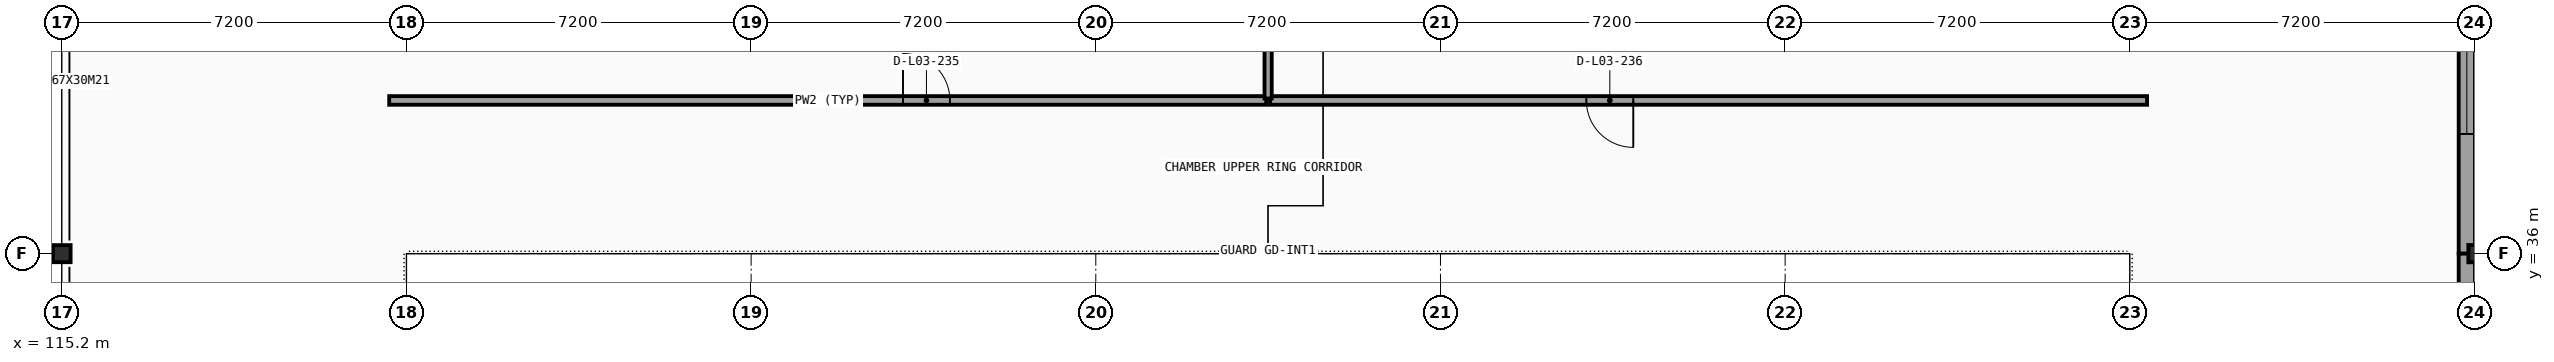
"""IFC4 building model, lengths in metres.
Left out: names, types, materials, properties, quantities, classifications, styles, units other than length and angle.
Written with IfcOpenShell. Run it as: python <this file> out.ifc"""

import sys

from ifc_helpers import new_model, si_unit, direction, frame, frame_2d, origin, origin_2d, place, context, subcontext, project, spatial, rectangle, i_section, extrude, element, fill, save


model = new_model("IFC4")
c1 = context("Model", 3, precision=1e-05, world=origin(), true_north=direction((0.0, 1.0)))
c2 = subcontext(c1, "Body", "Model", "MODEL_VIEW")
j1 = project(units=[si_unit("LENGTHUNIT", "METRE"), si_unit("PLANEANGLEUNIT", "RADIAN")], contexts=[c1])
p1 = place(None, origin())
s1 = spatial("IfcSite", under=j1, at=p1, CompositionType="ELEMENT")
p2 = place(p1, origin())
s2 = spatial("IfcBuilding", under=s1, at=p2, CompositionType="ELEMENT")
p3 = place(p2, frame((0.0, 0.0, 14.7)))
s3 = spatial("IfcBuildingStorey", under=s2, at=p3, CompositionType="ELEMENT", Elevation=14.7)
p4 = place(p3, frame((115.2, 36.0, 0.0), z_axis=(0.0, 0.0, 1.0), x_axis=(1.0, 0.0, 0.0)))
e1 = element("IfcColumn", 1, at=p4, inside=s3, PredefinedType="COLUMN", context=c2, shape_type="SweptSolid", body=[
    extrude(i_section(OverallWidth=0.369, OverallDepth=0.356, WebThickness=0.011, FlangeThickness=0.018, FilletRadius=0.018, at=origin_2d()), origin(), (0.0, 0.0, 1.0), 4.2),
])
p5 = place(p3, frame((165.6, 36.0, 0.0), z_axis=(0.0, 0.0, 1.0), x_axis=(1.0, 0.0, 0.0)))
e2 = element("IfcColumn", 2, at=p5, inside=s3, PredefinedType="COLUMN", context=c2, shape_type="SweptSolid", body=[
    extrude(i_section(OverallWidth=0.256, OverallDepth=0.36, WebThickness=0.011, FlangeThickness=0.02, FilletRadius=0.015, at=origin_2d()), origin(), (0.0, 0.0, 1.0), 4.2),
])
p6 = place(p3, frame((165.44, 43.2, 0.0), z_axis=(0.0, 0.0, 1.0), x_axis=(0.0, -1.0, 0.0)))
e3 = element("IfcWall", 3, at=p6, inside=s3, PredefinedType="SOLIDWALL", context=c2, shape_type="SweptSolid", body=[
    extrude(rectangle(XDim=7.2, YDim=0.34, at=frame_2d((3.6, 0.0))), origin(), (0.0, 0.0, 1.0), 3.018),
])
p7 = place(p6, frame((2.5, 0.0, 1.4)))
e4 = element("IfcOpeningElement", 4, at=p7, cuts=e3, PredefinedType="OPENING", context=c2, shape_type="SweptSolid", body=[
    extrude(rectangle(XDim=2.2, YDim=1.05, at=frame_2d((1.1, 0.525))), frame((0.0, 0.18, 0.0), z_axis=(0.0, -1.0, 0.0), x_axis=(1.0, 0.0, 0.0)), (0.0, 0.0, 1.0), 0.36),
])
p8 = place(p3, frame((165.44, 36.0, 0.0), z_axis=(0.0, 0.0, 1.0), x_axis=(0.0, -1.0, 0.0)))
e5 = element("IfcWall", 5, at=p8, inside=s3, PredefinedType="SOLIDWALL", context=c2, shape_type="SweptSolid", body=[
    extrude(rectangle(XDim=7.2, YDim=0.34, at=frame_2d((3.6, 0.0))), origin(), (0.0, 0.0, 1.0), 3.235),
])
p9 = place(p8, frame((2.5, 0.0, 1.4)))
e6 = element("IfcOpeningElement", 6, at=p9, cuts=e5, PredefinedType="OPENING", context=c2, shape_type="SweptSolid", body=[
    extrude(rectangle(XDim=2.2, YDim=1.05, at=frame_2d((1.1, 0.525))), frame((0.0, 0.18, 0.0), z_axis=(0.0, -1.0, 0.0), x_axis=(1.0, 0.0, 0.0)), (0.0, 0.0, 1.0), 0.36),
])
p10 = place(p3, frame((122.04, 39.2, 0.0), z_axis=(0.0, 0.0, 1.0), x_axis=(1.0, 0.0, 0.0)))
e7 = element("IfcWall", 7, at=p10, inside=s3, PredefinedType="PARTITIONING", context=c2, shape_type="SweptSolid", body=[
    extrude(rectangle(XDim=18.32, YDim=0.18, at=frame_2d((9.16, 0.0))), origin(), (0.0, 0.0, 1.0), 3.022),
])
p11 = place(p10, frame((10.732, 0.0, 0.0)))
e8 = element("IfcOpeningElement", 8, at=p11, cuts=e7, PredefinedType="OPENING", context=c2, shape_type="SweptSolid", body=[
    extrude(rectangle(XDim=0.98, YDim=2.1, at=frame_2d((0.49, 1.05))), frame((0.0, 0.1, 0.0), z_axis=(0.0, -1.0, 0.0), x_axis=(1.0, 0.0, 0.0)), (0.0, 0.0, 1.0), 0.2),
])
p12 = place(p3, frame((140.44, 39.2, 0.0), z_axis=(0.0, 0.0, 1.0), x_axis=(1.0, 0.0, 0.0)))
e9 = element("IfcWall", 9, at=p12, inside=s3, PredefinedType="PARTITIONING", context=c2, shape_type="SweptSolid", body=[
    extrude(rectangle(XDim=18.32, YDim=0.18, at=frame_2d((9.16, 0.0))), origin(), (0.0, 0.0, 1.0), 3.022),
])
p13 = place(p12, frame((6.607, 0.0, 0.0)))
e10 = element("IfcOpeningElement", 10, at=p13, cuts=e9, PredefinedType="OPENING", context=c2, shape_type="SweptSolid", body=[
    extrude(rectangle(XDim=0.98, YDim=2.1, at=frame_2d((0.49, 1.05))), frame((0.0, 0.1, 0.0), z_axis=(0.0, -1.0, 0.0), x_axis=(1.0, 0.0, 0.0)), (0.0, 0.0, 1.0), 0.2),
])
p14 = place(p3, frame((140.4, 39.24, 0.0), z_axis=(0.0, 0.0, 1.0), x_axis=(0.0, 1.0, 0.0)))
e11 = element("IfcWall", 11, at=p14, inside=s3, PredefinedType="PARTITIONING", context=c2, shape_type="SweptSolid", body=[
    extrude(rectangle(XDim=3.02, YDim=0.15, at=frame_2d((1.51, 0.0))), origin(), (0.0, 0.0, 1.0), 3.95),
])
p15 = place(p7, origin())
e12 = element("IfcWindow", 12, at=p15, inside=s3, PartitioningType="SINGLE_PANEL", PredefinedType="WINDOW", context=c2, shape_type="SweptSolid", body=[
    extrude(rectangle(XDim=2.2, YDim=1.05, at=frame_2d((1.1, 0.525))), frame((0.0, 0.03, 0.0), z_axis=(0.0, -1.0, 0.0), x_axis=(1.0, 0.0, 0.0)), (0.0, 0.0, 1.0), 0.06),
])
fill(e4, e12)
p16 = place(p11, origin())
e13 = element("IfcDoor", 13, at=p16, inside=s3, OperationType="SINGLE_SWING_LEFT", PredefinedType="DOOR", context=c2, shape_type="SweptSolid", body=[
    extrude(rectangle(XDim=0.98, YDim=2.1, at=frame_2d((0.49, 1.05))), frame((0.0, 0.025, 0.0), z_axis=(0.0, -1.0, 0.0), x_axis=(1.0, 0.0, 0.0)), (0.0, 0.0, 1.0), 0.05),
])
fill(e8, e13)
p17 = place(p13, origin())
e14 = element("IfcDoor", 14, at=p17, inside=s3, OperationType="SINGLE_SWING_RIGHT", PredefinedType="DOOR", context=c2, shape_type="SweptSolid", body=[
    extrude(rectangle(XDim=0.98, YDim=2.1, at=frame_2d((0.49, 1.05))), frame((0.0, 0.025, 0.0), z_axis=(0.0, -1.0, 0.0), x_axis=(1.0, 0.0, 0.0)), (0.0, 0.0, 1.0), 0.05),
])
fill(e10, e14)
save(model, sys.argv[1])
